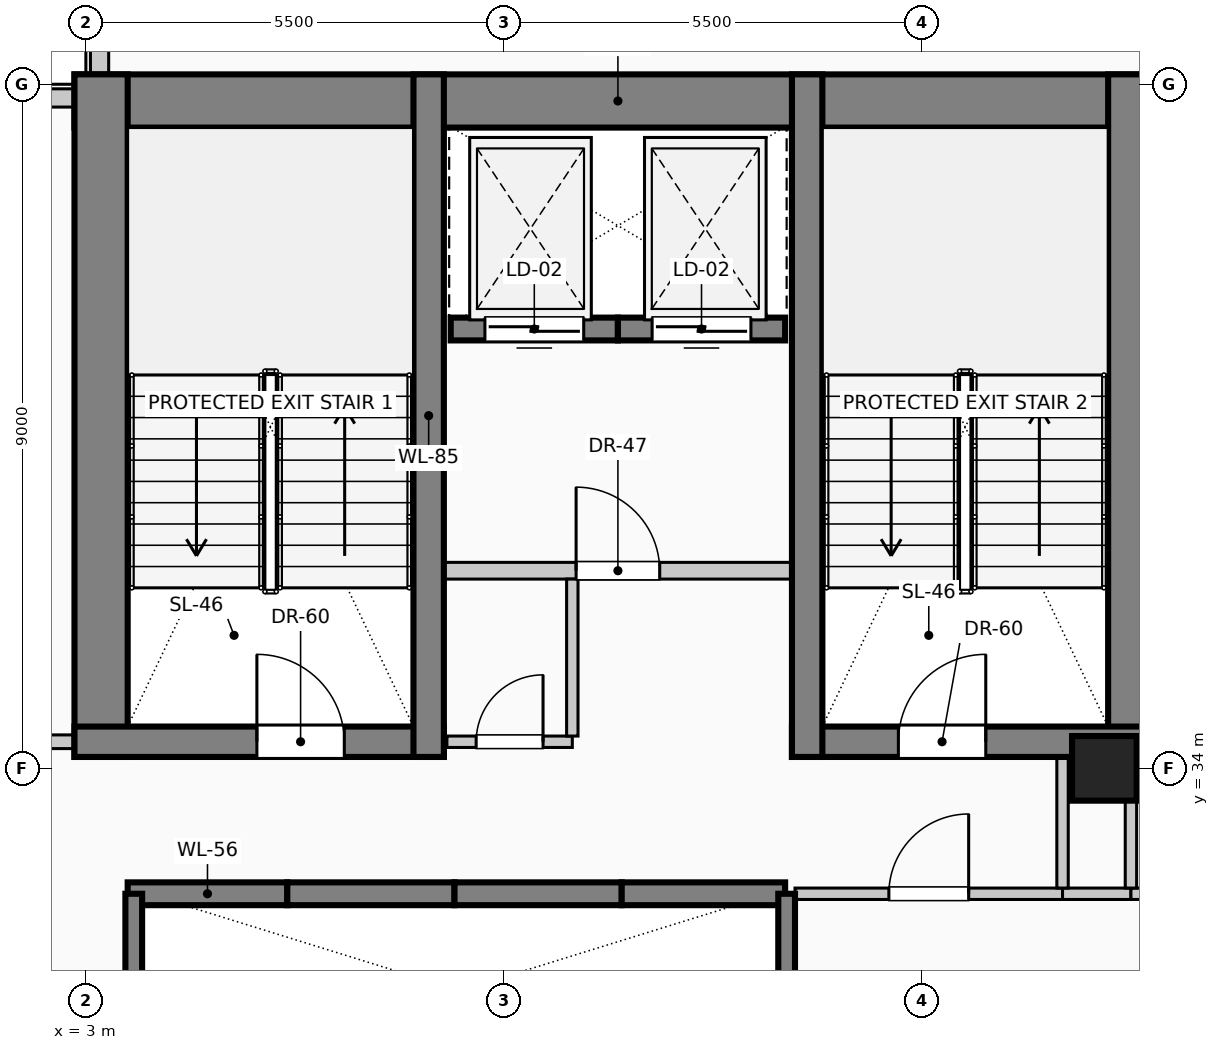
"""IFC4 building model, lengths in metres.
Left out: names, types, materials, properties, quantities, classifications, styles, units other than length and angle.
Written with IfcOpenShell. Run it as: python <this file> out.ifc"""

import sys

from ifc_helpers import new_model, si_unit, direction, frame, frame_2d, origin, origin_2d, place, context, subcontext, project, spatial, rectangle, circle, extrude, element, fill, save


model = new_model("IFC4")
c1 = context("Model", 3, precision=1e-05, world=origin(), true_north=direction((0.0, 1.0)))
c2 = subcontext(c1, "Body", "Model", "MODEL_VIEW")
j1 = project(units=[si_unit("LENGTHUNIT", "METRE"), si_unit("PLANEANGLEUNIT", "RADIAN")], contexts=[c1])
p1 = place(None, origin())
s1 = spatial("IfcSite", under=j1, at=p1, CompositionType="ELEMENT")
p2 = place(p1, origin())
s2 = spatial("IfcBuilding", under=s1, at=p2, CompositionType="ELEMENT")
p3 = place(p2, frame((0.0, 0.0, 214.6)))
s3 = spatial("IfcBuildingStorey", under=s2, at=p3, CompositionType="ELEMENT", Elevation=214.6)
p4 = place(p3, frame((2.85, 42.78, 0.0), z_axis=(0.0, 0.0, 1.0), x_axis=(1.0, 0.0, 0.0)))
e1 = element("IfcWall", 1, at=p4, inside=s3, PredefinedType="SHEAR", context=c2, shape_type="SweptSolid", body=[
    extrude(rectangle(XDim=14.3, YDim=0.7, at=frame_2d((7.15, 0.0))), origin(), (0.0, 0.0, 1.0), 4.0),
])
for number, where, z_axis, x_axis in (
    (2, (3.2, 34.15, 0.0), (0.0, 0.0, 1.0), (0.0, 1.0, 0.0)),
    (3, (16.8, 34.15, 0.0), (0.0, 0.0, 1.0), (0.0, 1.0, 0.0)),
):
    element("IfcWall", number, at=place(p3, frame(where, z_axis=z_axis, x_axis=x_axis)), inside=s3, PredefinedType="SHEAR", context=c2, shape_type="SweptSolid", body=[
        extrude(rectangle(XDim=8.98, YDim=0.7, at=frame_2d((4.49, 0.0))), origin(), (0.0, 0.0, 1.0), 4.0),
    ])
p5 = place(p3, frame((2.85, 34.35, 0.0), z_axis=(0.0, 0.0, 1.0), x_axis=(1.0, 0.0, 0.0)))
e4 = element("IfcWall", 4, at=p5, inside=s3, PredefinedType="SHEAR", context=c2, shape_type="SweptSolid", body=[
    extrude(rectangle(XDim=4.86, YDim=0.4, at=frame_2d((2.43, 0.0))), origin(), (0.0, 0.0, 1.0), 4.0),
])
p6 = place(p5, frame((2.4, 0.0, 0.0)))
e5 = element("IfcOpeningElement", 5, at=p6, cuts=e4, PredefinedType="OPENING", context=c2, shape_type="SweptSolid", body=[
    extrude(rectangle(XDim=1.15, YDim=2.2, at=frame_2d((0.575, 1.1))), frame((0.0, 0.21, 0.0), z_axis=(0.0, -1.0, 0.0), x_axis=(1.0, 0.0, 0.0)), (0.0, 0.0, 1.0), 0.42),
])
p7 = place(p3, frame((12.29, 34.35, 0.0), z_axis=(0.0, 0.0, 1.0), x_axis=(1.0, 0.0, 0.0)))
e6 = element("IfcWall", 6, at=p7, inside=s3, PredefinedType="SHEAR", context=c2, shape_type="SweptSolid", body=[
    extrude(rectangle(XDim=4.86, YDim=0.4, at=frame_2d((2.43, 0.0))), origin(), (0.0, 0.0, 1.0), 4.0),
])
p8 = place(p7, frame((1.4, 0.0, 0.0)))
e7 = element("IfcOpeningElement", 7, at=p8, cuts=e6, PredefinedType="OPENING", context=c2, shape_type="SweptSolid", body=[
    extrude(rectangle(XDim=1.15, YDim=2.2, at=frame_2d((0.575, 1.1))), frame((0.0, 0.21, 0.0), z_axis=(0.0, -1.0, 0.0), x_axis=(1.0, 0.0, 0.0)), (0.0, 0.0, 1.0), 0.42),
])
for number, where, z_axis, x_axis in (
    (8, (7.51, 34.15, 0.0), (0.0, 0.0, 1.0), (0.0, 1.0, 0.0)),
    (9, (12.49, 34.15, 0.0), (0.0, 0.0, 1.0), (0.0, 1.0, 0.0)),
):
    element("IfcWall", number, at=place(p3, frame(where, z_axis=z_axis, x_axis=x_axis)), inside=s3, PredefinedType="SHEAR", context=c2, shape_type="SweptSolid", body=[
        extrude(rectangle(XDim=8.98, YDim=0.4, at=frame_2d((4.49, 0.0))), origin(), (0.0, 0.0, 1.0), 4.0),
    ])
p9 = place(p3, frame((16.4, 34.0, 0.0), z_axis=(0.0, 0.0, 1.0), x_axis=(1.0, 0.0, 0.0)))
e10 = element("IfcColumn", 10, at=p9, inside=s3, PredefinedType="COLUMN", context=c2, shape_type="SweptSolid", body=[
    extrude(circle(Radius=0.425, at=origin_2d()), origin(), (0.0, 0.0, 1.0), 4.0),
])
p10 = place(p3, frame((0.6, 42.82, 0.0), z_axis=(0.0, 0.0, 1.0), x_axis=(1.0, 0.0, 0.0)))
e11 = element("IfcWall", 11, at=p10, inside=s3, PredefinedType="SOLIDWALL", context=c2, shape_type="SweptSolid", body=[
    extrude(rectangle(XDim=2.245, YDim=0.24, at=frame_2d((1.123, 0.0))), origin(), (0.0, 0.0, 1.0), 3.75),
])
p11 = place(p3, frame((3.18, 43.135, 0.0), z_axis=(0.0, 0.0, 1.0), x_axis=(0.0, 1.0, 0.0)))
e12 = element("IfcWall", 12, at=p11, inside=s3, PredefinedType="SOLIDWALL", context=c2, shape_type="SweptSolid", body=[
    extrude(rectangle(XDim=2.265, YDim=0.24, at=frame_2d((1.132, 0.0))), origin(), (0.0, 0.0, 1.0), 3.75),
])
p12 = place(p3, frame((3.55, 32.35, 0.0), z_axis=(0.0, 0.0, 1.0), x_axis=(1.0, 0.0, 0.0)))
e13 = element("IfcWall", 13, at=p12, inside=s3, PredefinedType="SOLIDWALL", context=c2, shape_type="SweptSolid", body=[
    extrude(rectangle(XDim=2.1, YDim=0.3, at=frame_2d((1.05, 0.0))), origin(), (0.0, 0.0, 1.0), 4.0),
])
p13 = place(p3, frame((5.65, 32.35, 0.0), z_axis=(0.0, 0.0, 1.0), x_axis=(1.0, 0.0, 0.0)))
e14 = element("IfcWall", 14, at=p13, inside=s3, PredefinedType="SOLIDWALL", context=c2, shape_type="SweptSolid", body=[
    extrude(rectangle(XDim=2.2, YDim=0.3, at=frame_2d((1.1, 0.0))), origin(), (0.0, 0.0, 1.0), 4.0),
])
p14 = place(p3, frame((7.85, 32.35, 0.0), z_axis=(0.0, 0.0, 1.0), x_axis=(1.0, 0.0, 0.0)))
e15 = element("IfcWall", 15, at=p14, inside=s3, PredefinedType="SOLIDWALL", context=c2, shape_type="SweptSolid", body=[
    extrude(rectangle(XDim=2.2, YDim=0.3, at=frame_2d((1.1, 0.0))), origin(), (0.0, 0.0, 1.0), 4.0),
])
p15 = place(p3, frame((10.05, 32.35, 0.0), z_axis=(0.0, 0.0, 1.0), x_axis=(1.0, 0.0, 0.0)))
e16 = element("IfcWall", 16, at=p15, inside=s3, PredefinedType="SOLIDWALL", context=c2, shape_type="SweptSolid", body=[
    extrude(rectangle(XDim=2.15, YDim=0.3, at=frame_2d((1.075, 0.0))), origin(), (0.0, 0.0, 1.0), 4.0),
])
p16 = place(p3, frame((10.0, 39.78, 0.0), z_axis=(0.0, 0.0, 1.0), x_axis=(-1.0, 0.0, 0.0)))
e17 = element("IfcWall", 17, at=p16, inside=s3, PredefinedType="SOLIDWALL", context=c2, shape_type="SweptSolid", body=[
    extrude(rectangle(XDim=2.2, YDim=0.3, at=frame_2d((1.1, 0.0))), origin(), (0.0, 0.0, 1.0), 4.0),
])
p17 = place(p16, frame((0.45, 0.0, 0.0)))
e18 = element("IfcOpeningElement", 18, at=p17, cuts=e17, PredefinedType="OPENING", context=c2, shape_type="SweptSolid", body=[
    extrude(rectangle(XDim=1.3, YDim=2.25, at=frame_2d((0.65, 1.125))), frame((0.0, 0.16, 0.0), z_axis=(0.0, -1.0, 0.0), x_axis=(1.0, 0.0, 0.0)), (0.0, 0.0, 1.0), 0.32),
])
p18 = place(p3, frame((12.2, 39.78, 0.0), z_axis=(0.0, 0.0, 1.0), x_axis=(-1.0, 0.0, 0.0)))
e19 = element("IfcWall", 19, at=p18, inside=s3, PredefinedType="SOLIDWALL", context=c2, shape_type="SweptSolid", body=[
    extrude(rectangle(XDim=2.2, YDim=0.3, at=frame_2d((1.1, 0.0))), origin(), (0.0, 0.0, 1.0), 4.0),
])
p19 = place(p18, frame((0.45, 0.0, 0.0)))
e20 = element("IfcOpeningElement", 20, at=p19, cuts=e19, PredefinedType="OPENING", context=c2, shape_type="SweptSolid", body=[
    extrude(rectangle(XDim=1.3, YDim=2.25, at=frame_2d((0.65, 1.125))), frame((0.0, 0.16, 0.0), z_axis=(0.0, -1.0, 0.0), x_axis=(1.0, 0.0, 0.0)), (0.0, 0.0, 1.0), 0.32),
])
p20 = place(p3, frame((3.63, 26.8, 0.0), z_axis=(0.0, 0.0, 1.0), x_axis=(0.0, 1.0, 0.0)))
e21 = element("IfcWall", 21, at=p20, inside=s3, PredefinedType="SOLIDWALL", context=c2, shape_type="SweptSolid", body=[
    extrude(rectangle(XDim=5.55, YDim=0.22, at=frame_2d((2.775, 0.0))), origin(), (0.0, 0.0, 1.0), 4.0),
])
p21 = place(p3, frame((12.22, 29.75, 0.0), z_axis=(0.0, 0.0, 1.0), x_axis=(0.0, 1.0, 0.0)))
e22 = element("IfcWall", 22, at=p21, inside=s3, PredefinedType="SOLIDWALL", context=c2, shape_type="SweptSolid", body=[
    extrude(rectangle(XDim=2.6, YDim=0.22, at=frame_2d((1.3, 0.0))), origin(), (0.0, 0.0, 1.0), 4.0),
])
p22 = place(p3, frame((7.51, 36.6, 0.0), z_axis=(0.0, 0.0, 1.0), x_axis=(1.0, 0.0, 0.0)))
e23 = element("IfcWall", 23, at=p22, inside=s3, PredefinedType="PARTITIONING", context=c2, shape_type="SweptSolid", body=[
    extrude(rectangle(XDim=4.98, YDim=0.22, at=frame_2d((2.49, 0.0))), origin(), (0.0, 0.0, 1.0), 3.75),
])
p23 = place(p22, frame((1.94, 0.0, 0.0)))
e24 = element("IfcOpeningElement", 24, at=p23, cuts=e23, PredefinedType="OPENING", context=c2, shape_type="SweptSolid", body=[
    extrude(rectangle(XDim=1.1, YDim=2.2, at=frame_2d((0.55, 1.1))), frame((0.0, 0.12, 0.0), z_axis=(0.0, -1.0, 0.0), x_axis=(1.0, 0.0, 0.0)), (0.0, 0.0, 1.0), 0.24),
])
p24 = place(p3, frame((12.33, 32.35, 0.0), z_axis=(0.0, 0.0, 1.0), x_axis=(1.0, 0.0, 0.0)))
e25 = element("IfcWall", 25, at=p24, inside=s3, PredefinedType="PARTITIONING", context=c2, shape_type="SweptSolid", body=[
    extrude(rectangle(XDim=3.52, YDim=0.15, at=frame_2d((1.76, 0.0))), origin(), (0.0, 0.0, 1.0), 3.75),
])
p25 = place(p24, frame((1.235, 0.0, 0.0)))
e26 = element("IfcOpeningElement", 26, at=p25, cuts=e25, PredefinedType="OPENING", context=c2, shape_type="SweptSolid", body=[
    extrude(rectangle(XDim=1.05, YDim=2.15, at=frame_2d((0.525, 1.075))), frame((0.0, 0.085, 0.0), z_axis=(0.0, -1.0, 0.0), x_axis=(1.0, 0.0, 0.0)), (0.0, 0.0, 1.0), 0.17),
])
p26 = place(p3, frame((15.85, 32.35, 0.0), z_axis=(0.0, 0.0, 1.0), x_axis=(1.0, 0.0, 0.0)))
e27 = element("IfcWall", 27, at=p26, inside=s3, PredefinedType="PARTITIONING", context=c2, shape_type="SweptSolid", body=[
    extrude(rectangle(XDim=0.9, YDim=0.15, at=frame_2d((0.45, 0.0))), origin(), (0.0, 0.0, 1.0), 3.75),
])
p27 = place(p3, frame((16.75, 32.35, 0.0), z_axis=(0.0, 0.0, 1.0), x_axis=(1.0, 0.0, 0.0)))
e28 = element("IfcWall", 28, at=p27, inside=s3, PredefinedType="PARTITIONING", context=c2, shape_type="SweptSolid", body=[
    extrude(rectangle(XDim=4.25, YDim=0.15, at=frame_2d((2.125, 0.0))), origin(), (0.0, 0.0, 1.0), 3.75),
])
p28 = place(p3, frame((1.15, 34.35, 0.0), z_axis=(0.0, 0.0, 1.0), x_axis=(1.0, 0.0, 0.0)))
e29 = element("IfcWall", 29, at=p28, inside=s3, PredefinedType="PARTITIONING", context=c2, shape_type="SweptSolid", body=[
    extrude(rectangle(XDim=1.7, YDim=0.18, at=frame_2d((0.85, 0.0))), origin(), (0.0, 0.0, 1.0), 3.75),
])
p29 = place(p3, frame((7.75, 34.35, 0.0), z_axis=(0.0, 0.0, 1.0), x_axis=(1.0, 0.0, 0.0)))
e30 = element("IfcWall", 30, at=p29, inside=s3, PredefinedType="PARTITIONING", context=c2, shape_type="SweptSolid", body=[
    extrude(rectangle(XDim=1.65, YDim=0.15, at=frame_2d((0.825, 0.0))), origin(), (0.0, 0.0, 1.0), 3.75),
])
p30 = place(p29, frame((0.385, 0.0, 0.0)))
e31 = element("IfcOpeningElement", 31, at=p30, cuts=e30, PredefinedType="OPENING", context=c2, shape_type="SweptSolid", body=[
    extrude(rectangle(XDim=0.88, YDim=2.1, at=frame_2d((0.44, 1.05))), frame((0.0, 0.085, 0.0), z_axis=(0.0, -1.0, 0.0), x_axis=(1.0, 0.0, 0.0)), (0.0, 0.0, 1.0), 0.17),
])
p31 = place(p3, frame((9.4, 34.425, 0.0), z_axis=(0.0, 0.0, 1.0), x_axis=(0.0, 1.0, 0.0)))
e32 = element("IfcWall", 32, at=p31, inside=s3, PredefinedType="PARTITIONING", context=c2, shape_type="SweptSolid", body=[
    extrude(rectangle(XDim=2.065, YDim=0.15, at=frame_2d((1.032, 0.0))), origin(), (0.0, 0.0, 1.0), 3.75),
])
p32 = place(p3, frame((15.85, 32.425, 0.0), z_axis=(0.0, 0.0, 1.0), x_axis=(0.0, 1.0, 0.0)))
e33 = element("IfcWall", 33, at=p32, inside=s3, PredefinedType="PARTITIONING", context=c2, shape_type="SweptSolid", body=[
    extrude(rectangle(XDim=1.725, YDim=0.15, at=frame_2d((0.862, 0.0))), origin(), (0.0, 0.0, 1.0), 3.75),
])
p33 = place(p3, frame((16.75, 32.425, 0.0), z_axis=(0.0, 0.0, 1.0), x_axis=(0.0, 1.0, 0.0)))
e34 = element("IfcWall", 34, at=p33, inside=s3, PredefinedType="PARTITIONING", context=c2, shape_type="SweptSolid", body=[
    extrude(rectangle(XDim=1.15, YDim=0.15, at=frame_2d((0.575, 0.0))), origin(), (0.0, 0.0, 1.0), 3.75),
])
p34 = place(p17, origin())
e35 = element("IfcDoor", 35, at=p34, inside=s3, OperationType="SLIDING_TO_LEFT", PredefinedType="DOOR", context=c2, shape_type="SweptSolid", body=[
    extrude(rectangle(XDim=1.3, YDim=2.25, at=frame_2d((0.65, 1.125))), frame((0.0, 0.025, 0.0), z_axis=(0.0, -1.0, 0.0), x_axis=(1.0, 0.0, 0.0)), (0.0, 0.0, 1.0), 0.05),
])
fill(e18, e35)
p35 = place(p19, origin())
e36 = element("IfcDoor", 36, at=p35, inside=s3, OperationType="SLIDING_TO_RIGHT", PredefinedType="DOOR", context=c2, shape_type="SweptSolid", body=[
    extrude(rectangle(XDim=1.3, YDim=2.25, at=frame_2d((0.65, 1.125))), frame((0.0, 0.025, 0.0), z_axis=(0.0, -1.0, 0.0), x_axis=(1.0, 0.0, 0.0)), (0.0, 0.0, 1.0), 0.05),
])
fill(e20, e36)
p36 = place(p6, origin())
e37 = element("IfcDoor", 37, at=p36, inside=s3, OperationType="SINGLE_SWING_LEFT", PredefinedType="DOOR", context=c2, shape_type="SweptSolid", body=[
    extrude(rectangle(XDim=1.15, YDim=2.2, at=frame_2d((0.575, 1.1))), frame((0.0, 0.025, 0.0), z_axis=(0.0, -1.0, 0.0), x_axis=(1.0, 0.0, 0.0)), (0.0, 0.0, 1.0), 0.05),
])
fill(e5, e37)
p37 = place(p8, origin())
e38 = element("IfcDoor", 38, at=p37, inside=s3, OperationType="SINGLE_SWING_RIGHT", PredefinedType="DOOR", context=c2, shape_type="SweptSolid", body=[
    extrude(rectangle(XDim=1.15, YDim=2.2, at=frame_2d((0.575, 1.1))), frame((0.0, 0.025, 0.0), z_axis=(0.0, -1.0, 0.0), x_axis=(1.0, 0.0, 0.0)), (0.0, 0.0, 1.0), 0.05),
])
fill(e7, e38)
p38 = place(p23, origin())
e39 = element("IfcDoor", 39, at=p38, inside=s3, OperationType="SINGLE_SWING_LEFT", PredefinedType="DOOR", context=c2, shape_type="SweptSolid", body=[
    extrude(rectangle(XDim=1.1, YDim=2.2, at=frame_2d((0.55, 1.1))), frame((0.0, 0.025, 0.0), z_axis=(0.0, -1.0, 0.0), x_axis=(1.0, 0.0, 0.0)), (0.0, 0.0, 1.0), 0.05),
])
fill(e24, e39)
p39 = place(p25, origin())
e40 = element("IfcDoor", 40, at=p39, inside=s3, OperationType="SINGLE_SWING_RIGHT", PredefinedType="DOOR", context=c2, shape_type="SweptSolid", body=[
    extrude(rectangle(XDim=1.05, YDim=2.15, at=frame_2d((0.525, 1.075))), frame((0.0, 0.025, 0.0), z_axis=(0.0, -1.0, 0.0), x_axis=(1.0, 0.0, 0.0)), (0.0, 0.0, 1.0), 0.05),
])
fill(e26, e40)
p40 = place(p30, origin())
e41 = element("IfcDoor", 41, at=p40, inside=s3, OperationType="SINGLE_SWING_RIGHT", PredefinedType="DOOR", context=c2, shape_type="SweptSolid", body=[
    extrude(rectangle(XDim=0.88, YDim=2.1, at=frame_2d((0.44, 1.05))), frame((0.0, 0.025, 0.0), z_axis=(0.0, -1.0, 0.0), x_axis=(1.0, 0.0, 0.0)), (0.0, 0.0, 1.0), 0.05),
])
fill(e31, e41)
save(model, sys.argv[1])
